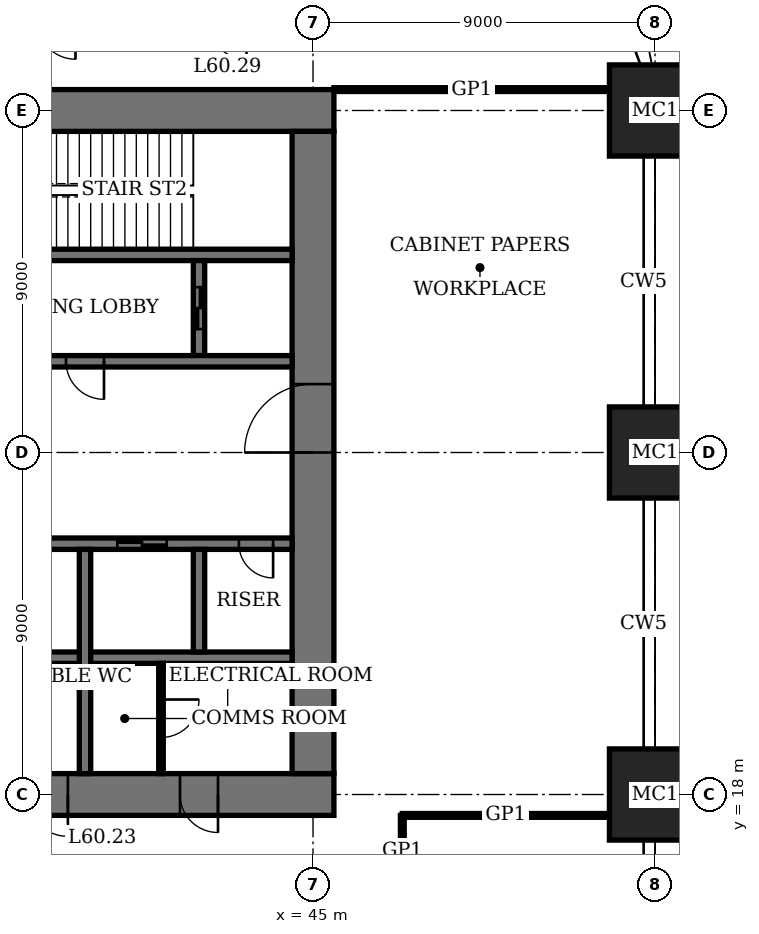
"""IFC4 building model, lengths in metres.
Left out: names, types, materials, properties, quantities, classifications, styles, units other than length and angle.
Written with IfcOpenShell. Run it as: python <this file> out.ifc"""

import sys

from ifc_helpers import new_model, si_unit, direction, frame, frame_2d, origin, origin_2d, place, context, subcontext, project, spatial, rectangle, extrude, element, fill, save


model = new_model("IFC4")
c1 = context("Model", 3, precision=1e-05, world=origin(), true_north=direction((0.0, 1.0)))
c2 = subcontext(c1, "Body", "Model", "MODEL_VIEW")
j1 = project(units=[si_unit("LENGTHUNIT", "METRE"), si_unit("PLANEANGLEUNIT", "RADIAN")], contexts=[c1])
p1 = place(None, origin())
s1 = spatial("IfcSite", under=j1, at=p1, CompositionType="ELEMENT")
p2 = place(p1, origin())
s2 = spatial("IfcBuilding", under=s1, at=p2, CompositionType="ELEMENT")
p3 = place(p2, frame((0.0, 0.0, 247.4)))
s3 = spatial("IfcBuildingStorey", under=s2, at=p3, CompositionType="ELEMENT", Elevation=247.4)
for number, where, z_axis, x_axis in (
    (1, (54.0, 18.0, 0.0), (0.0, 0.0, 1.0), (1.0, 0.0, 0.0)),
    (2, (54.0, 27.0, 0.0), (0.0, 0.0, 1.0), (1.0, 0.0, 0.0)),
    (3, (54.0, 36.0, 0.0), (0.0, 0.0, 1.0), (1.0, 0.0, 0.0)),
):
    element("IfcColumn", number, at=place(p3, frame(where, z_axis=z_axis, x_axis=x_axis)), inside=s3, PredefinedType="COLUMN", context=c2, shape_type="SweptSolid", body=[
        extrude(rectangle(XDim=2.4, YDim=2.4, at=origin_2d()), origin(), (0.0, 0.0, 1.0), 4.0),
    ])
p4 = place(p3, frame((17.45, 18.0, 0.0), z_axis=(0.0, 0.0, 1.0), x_axis=(1.0, 0.0, 0.0)))
e4 = element("IfcWall", 4, at=p4, inside=s3, PredefinedType="SHEAR", context=c2, shape_type="SweptSolid", body=[
    extrude(rectangle(XDim=28.1, YDim=1.1, at=frame_2d((14.05, 0.0))), origin(), (0.0, 0.0, 1.0), 4.0),
])
p5 = place(p4, frame((11.55, 0.0, 0.0)))
e5 = element("IfcOpeningElement", 5, at=p5, cuts=e4, PredefinedType="OPENING", context=c2, shape_type="SweptSolid", body=[
    extrude(rectangle(XDim=1.0, YDim=2.4, at=frame_2d((0.5, 1.2))), frame((0.0, 0.56, 0.0), z_axis=(0.0, -1.0, 0.0), x_axis=(1.0, 0.0, 0.0)), (0.0, 0.0, 1.0), 1.12),
])
p6 = place(p4, frame((16.55, 0.0, 0.0)))
e6 = element("IfcOpeningElement", 6, at=p6, cuts=e4, PredefinedType="OPENING", context=c2, shape_type="SweptSolid", body=[
    extrude(rectangle(XDim=1.0, YDim=2.4, at=frame_2d((0.5, 1.2))), frame((0.0, 0.56, 0.0), z_axis=(0.0, -1.0, 0.0), x_axis=(1.0, 0.0, 0.0)), (0.0, 0.0, 1.0), 1.12),
])
p7 = place(p4, frame((20.0, 0.0, 0.0)))
e7 = element("IfcOpeningElement", 7, at=p7, cuts=e4, PredefinedType="OPENING", context=c2, shape_type="SweptSolid", body=[
    extrude(rectangle(XDim=1.1, YDim=2.4, at=frame_2d((0.55, 1.2))), frame((0.0, 0.56, 0.0), z_axis=(0.0, -1.0, 0.0), x_axis=(1.0, 0.0, 0.0)), (0.0, 0.0, 1.0), 1.12),
])
p8 = place(p4, frame((24.05, 0.0, 0.0)))
e8 = element("IfcOpeningElement", 8, at=p8, cuts=e4, PredefinedType="OPENING", context=c2, shape_type="SweptSolid", body=[
    extrude(rectangle(XDim=1.0, YDim=2.4, at=frame_2d((0.5, 1.2))), frame((0.0, 0.56, 0.0), z_axis=(0.0, -1.0, 0.0), x_axis=(1.0, 0.0, 0.0)), (0.0, 0.0, 1.0), 1.12),
])
p9 = place(p3, frame((45.55, 36.0, 0.0), z_axis=(0.0, 0.0, 1.0), x_axis=(-1.0, 0.0, 0.0)))
e9 = element("IfcWall", 9, at=p9, inside=s3, PredefinedType="SHEAR", context=c2, shape_type="SweptSolid", body=[
    extrude(rectangle(XDim=28.1, YDim=1.1, at=frame_2d((14.05, 0.0))), origin(), (0.0, 0.0, 1.0), 4.0),
])
p10 = place(p9, frame((11.55, 0.0, 0.0)))
e10 = element("IfcOpeningElement", 10, at=p10, cuts=e9, PredefinedType="OPENING", context=c2, shape_type="SweptSolid", body=[
    extrude(rectangle(XDim=1.0, YDim=2.4, at=frame_2d((0.5, 1.2))), frame((0.0, 0.56, 0.0), z_axis=(0.0, -1.0, 0.0), x_axis=(1.0, 0.0, 0.0)), (0.0, 0.0, 1.0), 1.12),
])
p11 = place(p9, frame((16.55, 0.0, 0.0)))
e11 = element("IfcOpeningElement", 11, at=p11, cuts=e9, PredefinedType="OPENING", context=c2, shape_type="SweptSolid", body=[
    extrude(rectangle(XDim=1.0, YDim=2.4, at=frame_2d((0.5, 1.2))), frame((0.0, 0.56, 0.0), z_axis=(0.0, -1.0, 0.0), x_axis=(1.0, 0.0, 0.0)), (0.0, 0.0, 1.0), 1.12),
])
p12 = place(p9, frame((20.0, 0.0, 0.0)))
e12 = element("IfcOpeningElement", 12, at=p12, cuts=e9, PredefinedType="OPENING", context=c2, shape_type="SweptSolid", body=[
    extrude(rectangle(XDim=1.1, YDim=2.4, at=frame_2d((0.55, 1.2))), frame((0.0, 0.56, 0.0), z_axis=(0.0, -1.0, 0.0), x_axis=(1.0, 0.0, 0.0)), (0.0, 0.0, 1.0), 1.12),
])
p13 = place(p9, frame((24.05, 0.0, 0.0)))
e13 = element("IfcOpeningElement", 13, at=p13, cuts=e9, PredefinedType="OPENING", context=c2, shape_type="SweptSolid", body=[
    extrude(rectangle(XDim=1.0, YDim=2.4, at=frame_2d((0.5, 1.2))), frame((0.0, 0.56, 0.0), z_axis=(0.0, -1.0, 0.0), x_axis=(1.0, 0.0, 0.0)), (0.0, 0.0, 1.0), 1.12),
])
p14 = place(p3, frame((45.0, 18.55, 0.0), z_axis=(0.0, 0.0, 1.0), x_axis=(0.0, 1.0, 0.0)))
e14 = element("IfcWall", 14, at=p14, inside=s3, PredefinedType="SHEAR", context=c2, shape_type="SweptSolid", body=[
    extrude(rectangle(XDim=16.9, YDim=1.1, at=frame_2d((8.45, 0.0))), origin(), (0.0, 0.0, 1.0), 4.0),
])
p15 = place(p14, frame((8.45, 0.0, 0.0)))
e15 = element("IfcOpeningElement", 15, at=p15, cuts=e14, PredefinedType="OPENING", context=c2, shape_type="SweptSolid", body=[
    extrude(rectangle(XDim=1.8, YDim=2.4, at=frame_2d((0.9, 1.2))), frame((0.0, 0.56, 0.0), z_axis=(0.0, -1.0, 0.0), x_axis=(1.0, 0.0, 0.0)), (0.0, 0.0, 1.0), 1.12),
])
p16 = place(p3, frame((36.15, 32.2, 0.0), z_axis=(0.0, 0.0, 1.0), x_axis=(1.0, 0.0, 0.0)))
e16 = element("IfcWall", 16, at=p16, inside=s3, PredefinedType="SHEAR", context=c2, shape_type="SweptSolid", body=[
    extrude(rectangle(XDim=8.3, YDim=0.3, at=frame_2d((4.15, 0.0))), origin(), (0.0, 0.0, 1.0), 4.0),
])
p17 = place(p16, frame((0.45, 0.0, 0.0)))
e17 = element("IfcOpeningElement", 17, at=p17, cuts=e16, PredefinedType="OPENING", context=c2, shape_type="SweptSolid", body=[
    extrude(rectangle(XDim=1.0, YDim=2.4, at=frame_2d((0.5, 1.2))), frame((0.0, 0.16, 0.0), z_axis=(0.0, -1.0, 0.0), x_axis=(1.0, 0.0, 0.0)), (0.0, 0.0, 1.0), 0.32),
])
p18 = place(p3, frame((42.0, 29.55, 0.0), z_axis=(0.0, 0.0, 1.0), x_axis=(0.0, 1.0, 0.0)))
e18 = element("IfcWall", 18, at=p18, inside=s3, PredefinedType="SHEAR", context=c2, shape_type="SweptSolid", body=[
    extrude(rectangle(XDim=2.5, YDim=0.3, at=frame_2d((1.25, 0.0))), origin(), (0.0, 0.0, 1.0), 4.0),
])
p19 = place(p18, frame((0.7, 0.0, 0.0)))
e19 = element("IfcOpeningElement", 19, at=p19, cuts=e18, PredefinedType="OPENING", context=c2, shape_type="SweptSolid", body=[
    extrude(rectangle(XDim=1.1, YDim=2.4, at=frame_2d((0.55, 1.2))), frame((0.0, 0.16, 0.0), z_axis=(0.0, -1.0, 0.0), x_axis=(1.0, 0.0, 0.0)), (0.0, 0.0, 1.0), 0.32),
])
p20 = place(p3, frame((18.55, 24.6, 0.0), z_axis=(0.0, 0.0, 1.0), x_axis=(1.0, 0.0, 0.0)))
e20 = element("IfcWall", 20, at=p20, inside=s3, PredefinedType="SHEAR", context=c2, shape_type="SweptSolid", body=[
    extrude(rectangle(XDim=25.9, YDim=0.3, at=frame_2d((12.95, 0.0))), origin(), (0.0, 0.0, 1.0), 4.0),
])
p21 = place(p20, frame((4.95, 0.0, 0.0)))
e21 = element("IfcOpeningElement", 21, at=p21, cuts=e20, PredefinedType="OPENING", context=c2, shape_type="SweptSolid", body=[
    extrude(rectangle(XDim=1.0, YDim=2.4, at=frame_2d((0.5, 1.2))), frame((0.0, 0.16, 0.0), z_axis=(0.0, -1.0, 0.0), x_axis=(1.0, 0.0, 0.0)), (0.0, 0.0, 1.0), 0.32),
])
p22 = place(p20, frame((24.5, 0.0, 0.0)))
e22 = element("IfcOpeningElement", 22, at=p22, cuts=e20, PredefinedType="OPENING", context=c2, shape_type="SweptSolid", body=[
    extrude(rectangle(XDim=0.9, YDim=2.1, at=frame_2d((0.45, 1.05))), frame((0.0, 0.16, 0.0), z_axis=(0.0, -1.0, 0.0), x_axis=(1.0, 0.0, 0.0)), (0.0, 0.0, 1.0), 0.32),
])
p23 = place(p20, frame((9.4, 0.0, 0.0)))
e23 = element("IfcOpeningElement", 23, at=p23, cuts=e20, PredefinedType="OPENING", context=c2, shape_type="SweptSolid", body=[
    extrude(rectangle(XDim=1.1, YDim=2.4, at=frame_2d((0.55, 1.2))), frame((0.0, 0.16, 0.0), z_axis=(0.0, -1.0, 0.0), x_axis=(1.0, 0.0, 0.0)), (0.0, 0.0, 1.0), 0.32),
])
p24 = place(p20, frame((12.4, 0.0, 0.0)))
e24 = element("IfcOpeningElement", 24, at=p24, cuts=e20, PredefinedType="OPENING", context=c2, shape_type="SweptSolid", body=[
    extrude(rectangle(XDim=1.1, YDim=2.4, at=frame_2d((0.55, 1.2))), frame((0.0, 0.16, 0.0), z_axis=(0.0, -1.0, 0.0), x_axis=(1.0, 0.0, 0.0)), (0.0, 0.0, 1.0), 0.32),
])
p25 = place(p20, frame((15.4, 0.0, 0.0)))
e25 = element("IfcOpeningElement", 25, at=p25, cuts=e20, PredefinedType="OPENING", context=c2, shape_type="SweptSolid", body=[
    extrude(rectangle(XDim=1.1, YDim=2.4, at=frame_2d((0.55, 1.2))), frame((0.0, 0.16, 0.0), z_axis=(0.0, -1.0, 0.0), x_axis=(1.0, 0.0, 0.0)), (0.0, 0.0, 1.0), 0.32),
])
p26 = place(p20, frame((18.4, 0.0, 0.0)))
e26 = element("IfcOpeningElement", 26, at=p26, cuts=e20, PredefinedType="OPENING", context=c2, shape_type="SweptSolid", body=[
    extrude(rectangle(XDim=1.1, YDim=2.4, at=frame_2d((0.55, 1.2))), frame((0.0, 0.16, 0.0), z_axis=(0.0, -1.0, 0.0), x_axis=(1.0, 0.0, 0.0)), (0.0, 0.0, 1.0), 0.32),
])
p27 = place(p20, frame((21.3, 0.0, 0.0)))
e27 = element("IfcOpeningElement", 27, at=p27, cuts=e20, PredefinedType="OPENING", context=c2, shape_type="SweptSolid", body=[
    extrude(rectangle(XDim=1.3, YDim=2.4, at=frame_2d((0.65, 1.2))), frame((0.0, 0.16, 0.0), z_axis=(0.0, -1.0, 0.0), x_axis=(1.0, 0.0, 0.0)), (0.0, 0.0, 1.0), 0.32),
])
p28 = place(p3, frame((18.55, 29.4, 0.0), z_axis=(0.0, 0.0, 1.0), x_axis=(1.0, 0.0, 0.0)))
e28 = element("IfcWall", 28, at=p28, inside=s3, PredefinedType="SHEAR", context=c2, shape_type="SweptSolid", body=[
    extrude(rectangle(XDim=25.9, YDim=0.3, at=frame_2d((12.95, 0.0))), origin(), (0.0, 0.0, 1.0), 4.0),
])
p29 = place(p28, frame((19.95, 0.0, 0.0)))
e29 = element("IfcOpeningElement", 29, at=p29, cuts=e28, PredefinedType="OPENING", context=c2, shape_type="SweptSolid", body=[
    extrude(rectangle(XDim=1.0, YDim=2.4, at=frame_2d((0.5, 1.2))), frame((0.0, 0.16, 0.0), z_axis=(0.0, -1.0, 0.0), x_axis=(1.0, 0.0, 0.0)), (0.0, 0.0, 1.0), 0.32),
])
p30 = place(p28, frame((0.5, 0.0, 0.0)))
e30 = element("IfcOpeningElement", 30, at=p30, cuts=e28, PredefinedType="OPENING", context=c2, shape_type="SweptSolid", body=[
    extrude(rectangle(XDim=0.9, YDim=2.1, at=frame_2d((0.45, 1.05))), frame((0.0, 0.16, 0.0), z_axis=(0.0, -1.0, 0.0), x_axis=(1.0, 0.0, 0.0)), (0.0, 0.0, 1.0), 0.32),
])
p31 = place(p28, frame((15.45, 0.0, 0.0)))
e31 = element("IfcOpeningElement", 31, at=p31, cuts=e28, PredefinedType="OPENING", context=c2, shape_type="SweptSolid", body=[
    extrude(rectangle(XDim=1.0, YDim=2.4, at=frame_2d((0.5, 1.2))), frame((0.0, 0.16, 0.0), z_axis=(0.0, -1.0, 0.0), x_axis=(1.0, 0.0, 0.0)), (0.0, 0.0, 1.0), 0.32),
])
p32 = place(p28, frame((12.45, 0.0, 0.0)))
e32 = element("IfcOpeningElement", 32, at=p32, cuts=e28, PredefinedType="OPENING", context=c2, shape_type="SweptSolid", body=[
    extrude(rectangle(XDim=1.0, YDim=2.4, at=frame_2d((0.5, 1.2))), frame((0.0, 0.16, 0.0), z_axis=(0.0, -1.0, 0.0), x_axis=(1.0, 0.0, 0.0)), (0.0, 0.0, 1.0), 0.32),
])
p33 = place(p28, frame((9.45, 0.0, 0.0)))
e33 = element("IfcOpeningElement", 33, at=p33, cuts=e28, PredefinedType="OPENING", context=c2, shape_type="SweptSolid", body=[
    extrude(rectangle(XDim=1.0, YDim=2.4, at=frame_2d((0.5, 1.2))), frame((0.0, 0.16, 0.0), z_axis=(0.0, -1.0, 0.0), x_axis=(1.0, 0.0, 0.0)), (0.0, 0.0, 1.0), 0.32),
])
p34 = place(p28, frame((6.45, 0.0, 0.0)))
e34 = element("IfcOpeningElement", 34, at=p34, cuts=e28, PredefinedType="OPENING", context=c2, shape_type="SweptSolid", body=[
    extrude(rectangle(XDim=1.0, YDim=2.4, at=frame_2d((0.5, 1.2))), frame((0.0, 0.16, 0.0), z_axis=(0.0, -1.0, 0.0), x_axis=(1.0, 0.0, 0.0)), (0.0, 0.0, 1.0), 0.32),
])
p35 = place(p28, frame((3.3, 0.0, 0.0)))
e35 = element("IfcOpeningElement", 35, at=p35, cuts=e28, PredefinedType="OPENING", context=c2, shape_type="SweptSolid", body=[
    extrude(rectangle(XDim=1.3, YDim=2.4, at=frame_2d((0.65, 1.2))), frame((0.0, 0.16, 0.0), z_axis=(0.0, -1.0, 0.0), x_axis=(1.0, 0.0, 0.0)), (0.0, 0.0, 1.0), 0.32),
])
p36 = place(p3, frame((27.15, 21.6, 0.0), z_axis=(0.0, 0.0, 1.0), x_axis=(1.0, 0.0, 0.0)))
e36 = element("IfcWall", 36, at=p36, inside=s3, PredefinedType="SHEAR", context=c2, shape_type="SweptSolid", body=[
    extrude(rectangle(XDim=17.3, YDim=0.3, at=frame_2d((8.65, 0.0))), origin(), (0.0, 0.0, 1.0), 4.0),
])
p37 = place(p3, frame((39.0, 18.55, 0.0), z_axis=(0.0, 0.0, 1.0), x_axis=(0.0, 1.0, 0.0)))
e37 = element("IfcWall", 37, at=p37, inside=s3, PredefinedType="SHEAR", context=c2, shape_type="SweptSolid", body=[
    extrude(rectangle(XDim=5.9, YDim=0.3, at=frame_2d((2.95, 0.0))), origin(), (0.0, 0.0, 1.0), 4.0),
])
p38 = place(p3, frame((42.0, 21.75, 0.0), z_axis=(0.0, 0.0, 1.0), x_axis=(0.0, 1.0, 0.0)))
e38 = element("IfcWall", 38, at=p38, inside=s3, PredefinedType="SHEAR", context=c2, shape_type="SweptSolid", body=[
    extrude(rectangle(XDim=2.7, YDim=0.3, at=frame_2d((1.35, 0.0))), origin(), (0.0, 0.0, 1.0), 4.0),
])
p39 = place(p3, frame((47.35, 17.45, 0.0), z_axis=(0.0, 0.0, 1.0), x_axis=(1.0, 0.0, 0.0)))
e39 = element("IfcWall", 39, at=p39, inside=s3, PredefinedType="PARTITIONING", context=c2, shape_type="SweptSolid", body=[
    extrude(rectangle(XDim=5.45, YDim=0.1, at=frame_2d((2.725, 0.0))), origin(), (0.0, 0.0, 1.0), 3.75),
])
p40 = place(p3, frame((45.55, 36.55, 0.0), z_axis=(0.0, 0.0, 1.0), x_axis=(1.0, 0.0, 0.0)))
e40 = element("IfcWall", 40, at=p40, inside=s3, PredefinedType="PARTITIONING", context=c2, shape_type="SweptSolid", body=[
    extrude(rectangle(XDim=7.25, YDim=0.1, at=frame_2d((3.625, 0.0))), origin(), (0.0, 0.0, 1.0), 3.75),
])
p41 = place(p3, frame((47.35, 15.6, 0.0), z_axis=(0.0, 0.0, 1.0), x_axis=(0.0, 1.0, 0.0)))
e41 = element("IfcWall", 41, at=p41, inside=s3, PredefinedType="PARTITIONING", context=c2, shape_type="SweptSolid", body=[
    extrude(rectangle(XDim=1.85, YDim=0.1, at=frame_2d((0.925, 0.0))), origin(), (0.0, 0.0, 1.0), 3.75),
])
p42 = place(p3, frame((41.0, 18.55, 0.0), z_axis=(0.0, 0.0, 1.0), x_axis=(0.0, 1.0, 0.0)))
e42 = element("IfcWall", 42, at=p42, inside=s3, PredefinedType="PARTITIONING", context=c2, shape_type="SweptSolid", body=[
    extrude(rectangle(XDim=2.9, YDim=0.12, at=frame_2d((1.45, 0.0))), origin(), (0.0, 0.0, 1.0), 3.75),
])
p43 = place(p42, frame((0.95, 0.0, 0.0)))
e43 = element("IfcOpeningElement", 43, at=p43, cuts=e42, PredefinedType="OPENING", context=c2, shape_type="SweptSolid", body=[
    extrude(rectangle(XDim=1.0, YDim=2.4, at=frame_2d((0.5, 1.2))), frame((0.0, 0.07, 0.0), z_axis=(0.0, -1.0, 0.0), x_axis=(1.0, 0.0, 0.0)), (0.0, 0.0, 1.0), 0.14),
])
p44 = place(p15, origin())
e44 = element("IfcDoor", 44, at=p44, inside=s3, OperationType="DOUBLE_DOOR_DOUBLE_SWING", PredefinedType="DOOR", context=c2, shape_type="SweptSolid", body=[
    extrude(rectangle(XDim=1.8, YDim=2.4, at=frame_2d((0.9, 1.2))), frame((0.0, 0.03, 0.0), z_axis=(0.0, -1.0, 0.0), x_axis=(1.0, 0.0, 0.0)), (0.0, 0.0, 1.0), 0.06),
    extrude(rectangle(XDim=0.04, YDim=2.4, at=frame_2d((0.02, 1.2))), frame((0.0, 0.55, 0.0), z_axis=(0.0, -1.0, 0.0), x_axis=(1.0, 0.0, 0.0)), (0.0, 0.0, 1.0), 1.1),
    extrude(rectangle(XDim=0.04, YDim=2.4, at=frame_2d((1.78, 1.2))), frame((0.0, 0.55, 0.0), z_axis=(0.0, -1.0, 0.0), x_axis=(1.0, 0.0, 0.0)), (0.0, 0.0, 1.0), 1.1),
    extrude(rectangle(XDim=1.8, YDim=0.04, at=frame_2d((0.9, 2.38))), frame((0.0, 0.55, 0.0), z_axis=(0.0, -1.0, 0.0), x_axis=(1.0, 0.0, 0.0)), (0.0, 0.0, 1.0), 1.1),
])
fill(e15, e44)
p45 = place(p7, origin())
e45 = element("IfcDoor", 45, at=p45, inside=s3, OperationType="SINGLE_SWING_RIGHT", PredefinedType="DOOR", context=c2, shape_type="SweptSolid", body=[
    extrude(rectangle(XDim=1.1, YDim=2.4, at=frame_2d((0.55, 1.2))), frame((0.0, 0.025, 0.0), z_axis=(0.0, -1.0, 0.0), x_axis=(1.0, 0.0, 0.0)), (0.0, 0.0, 1.0), 0.05),
    extrude(rectangle(XDim=0.04, YDim=2.4, at=frame_2d((0.02, 1.2))), frame((0.0, 0.44, 0.0), z_axis=(0.0, -1.0, 0.0), x_axis=(1.0, 0.0, 0.0)), (0.0, 0.0, 1.0), 0.88),
    extrude(rectangle(XDim=0.04, YDim=2.4, at=frame_2d((1.08, 1.2))), frame((0.0, 0.44, 0.0), z_axis=(0.0, -1.0, 0.0), x_axis=(1.0, 0.0, 0.0)), (0.0, 0.0, 1.0), 0.88),
    extrude(rectangle(XDim=1.1, YDim=0.04, at=frame_2d((0.55, 2.38))), frame((0.0, 0.44, 0.0), z_axis=(0.0, -1.0, 0.0), x_axis=(1.0, 0.0, 0.0)), (0.0, 0.0, 1.0), 0.88),
])
fill(e7, e45)
p46 = place(p8, origin())
e46 = element("IfcDoor", 46, at=p46, inside=s3, OperationType="SINGLE_SWING_RIGHT", PredefinedType="DOOR", context=c2, shape_type="SweptSolid", body=[
    extrude(rectangle(XDim=1.0, YDim=2.4, at=frame_2d((0.5, 1.2))), frame((0.0, 0.025, 0.0), z_axis=(0.0, -1.0, 0.0), x_axis=(1.0, 0.0, 0.0)), (0.0, 0.0, 1.0), 0.05),
    extrude(rectangle(XDim=0.04, YDim=2.4, at=frame_2d((0.02, 1.2))), frame((0.0, 0.4, 0.0), z_axis=(0.0, -1.0, 0.0), x_axis=(1.0, 0.0, 0.0)), (0.0, 0.0, 1.0), 0.8),
    extrude(rectangle(XDim=0.04, YDim=2.4, at=frame_2d((0.98, 1.2))), frame((0.0, 0.4, 0.0), z_axis=(0.0, -1.0, 0.0), x_axis=(1.0, 0.0, 0.0)), (0.0, 0.0, 1.0), 0.8),
    extrude(rectangle(XDim=1.0, YDim=0.04, at=frame_2d((0.5, 2.38))), frame((0.0, 0.4, 0.0), z_axis=(0.0, -1.0, 0.0), x_axis=(1.0, 0.0, 0.0)), (0.0, 0.0, 1.0), 0.8),
])
fill(e8, e46)
p47 = place(p29, origin())
e47 = element("IfcDoor", 47, at=p47, inside=s3, OperationType="SINGLE_SWING_RIGHT", PredefinedType="DOOR", context=c2, shape_type="SweptSolid", body=[
    extrude(rectangle(XDim=1.0, YDim=2.4, at=frame_2d((0.5, 1.2))), frame((0.0, 0.03, 0.0), z_axis=(0.0, -1.0, 0.0), x_axis=(1.0, 0.0, 0.0)), (0.0, 0.0, 1.0), 0.06),
])
fill(e29, e47)
p48 = place(p22, origin())
e48 = element("IfcDoor", 48, at=p48, inside=s3, OperationType="SINGLE_SWING_RIGHT", PredefinedType="DOOR", context=c2, shape_type="SweptSolid", body=[
    extrude(rectangle(XDim=0.9, YDim=2.1, at=frame_2d((0.45, 1.05))), frame((0.0, 0.03, 0.0), z_axis=(0.0, -1.0, 0.0), x_axis=(1.0, 0.0, 0.0)), (0.0, 0.0, 1.0), 0.06),
])
fill(e22, e48)
p49 = place(p43, origin())
e49 = element("IfcDoor", 49, at=p49, inside=s3, OperationType="SINGLE_SWING_RIGHT", PredefinedType="DOOR", context=c2, shape_type="SweptSolid", body=[
    extrude(rectangle(XDim=1.0, YDim=2.4, at=frame_2d((0.5, 1.2))), frame((0.0, 0.03, 0.0), z_axis=(0.0, -1.0, 0.0), x_axis=(1.0, 0.0, 0.0)), (0.0, 0.0, 1.0), 0.06),
])
fill(e43, e49)
p50 = place(p27, origin())
e50 = element("IfcDoor", 50, at=p50, inside=s3, OperationType="DOUBLE_DOOR_SLIDING", PredefinedType="DOOR", context=c2, shape_type="SweptSolid", body=[
    extrude(rectangle(XDim=1.3, YDim=2.4, at=frame_2d((0.65, 1.2))), frame((0.0, 0.02, 0.0), z_axis=(0.0, -1.0, 0.0), x_axis=(1.0, 0.0, 0.0)), (0.0, 0.0, 1.0), 0.04),
])
fill(e27, e50)
p51 = place(p19, origin())
e51 = element("IfcDoor", 51, at=p51, inside=s3, OperationType="DOUBLE_DOOR_SLIDING", PredefinedType="DOOR", context=c2, shape_type="SweptSolid", body=[
    extrude(rectangle(XDim=1.1, YDim=2.4, at=frame_2d((0.55, 1.2))), frame((0.0, 0.03, 0.0), z_axis=(0.0, -1.0, 0.0), x_axis=(1.0, 0.0, 0.0)), (0.0, 0.0, 1.0), 0.06),
])
fill(e19, e51)
save(model, sys.argv[1])
